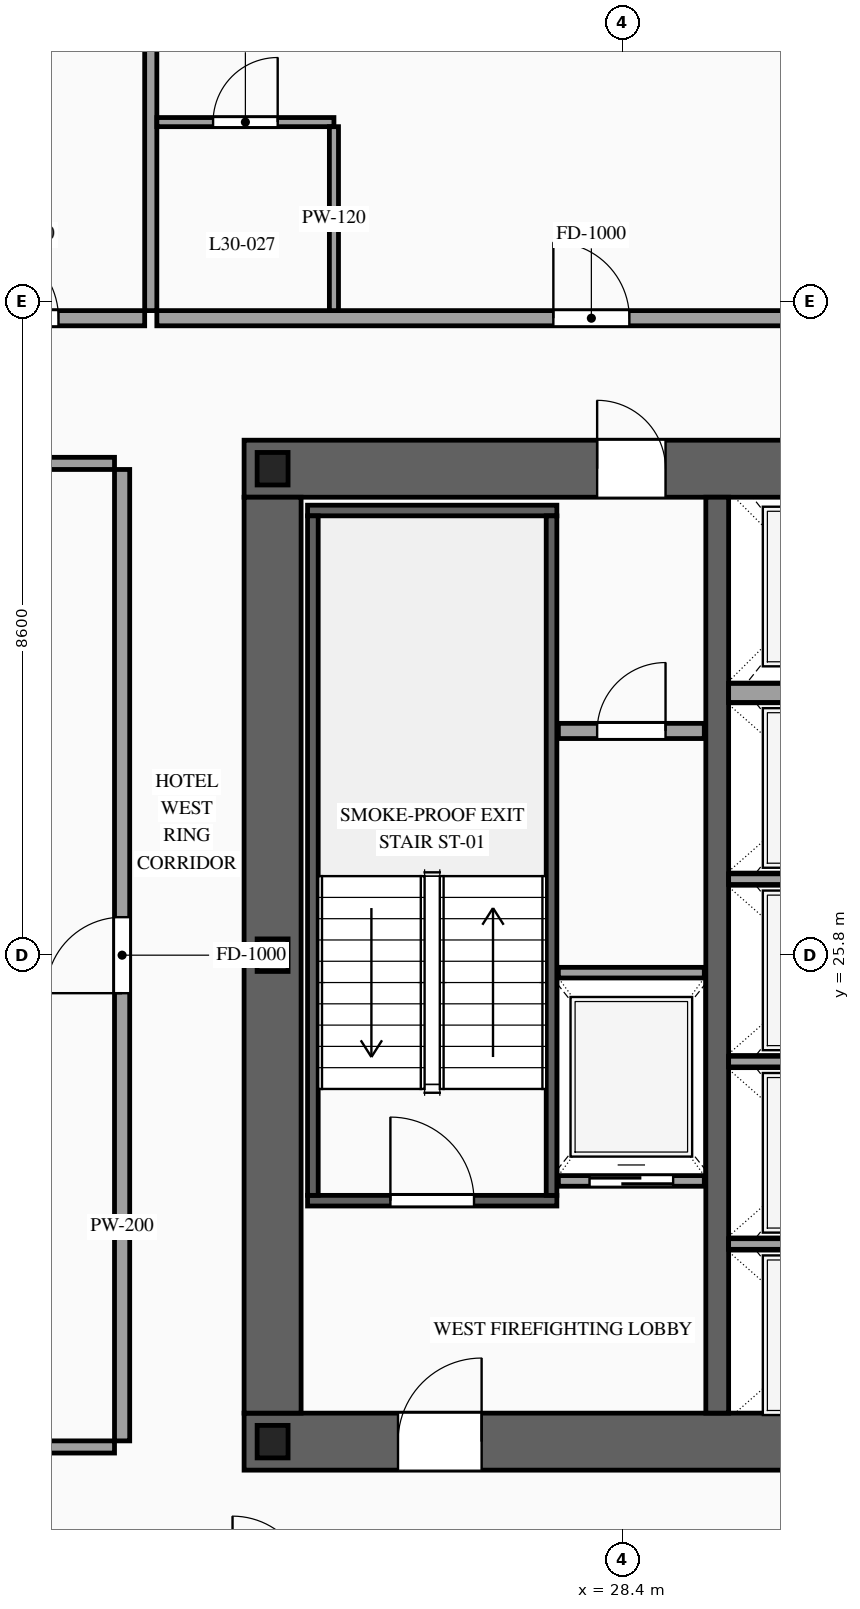
"""IFC4 building model, lengths in metres.
Left out: names, types, materials, properties, quantities, classifications, styles, units other than length and angle.
Written with IfcOpenShell. Run it as: python <this file> out.ifc"""

import sys

from ifc_helpers import new_model, si_unit, direction, frame, frame_2d, origin, origin_2d, place, context, subcontext, project, spatial, rectangle, i_section, extrude, source, transform, mapped, element, fill, save


model = new_model("IFC4")
c1 = context("Model", 3, precision=1e-05, world=origin(), true_north=direction((0.0, 1.0)))
c2 = subcontext(c1, "Body", "Model", "MODEL_VIEW")
j1 = project(units=[si_unit("LENGTHUNIT", "METRE"), si_unit("PLANEANGLEUNIT", "RADIAN")], contexts=[c1])
p1 = place(None, origin())
s1 = spatial("IfcSite", under=j1, at=p1, CompositionType="ELEMENT")
p2 = place(p1, origin())
s2 = spatial("IfcBuilding", under=s1, at=p2, CompositionType="ELEMENT")
p3 = place(p2, frame((0.0, 0.0, 115.4)))
s3 = spatial("IfcBuildingStorey", under=s2, at=p3, CompositionType="ELEMENT", Elevation=115.4)
p4 = place(p3, frame((23.425, 19.4, 0.0), z_axis=(0.0, 0.0, 1.0), x_axis=(1.0, 0.0, 0.0)))
e1 = element("IfcWall", 1, at=p4, inside=s3, PredefinedType="SHEAR", context=c2, shape_type="SweptSolid", body=[
    extrude(rectangle(XDim=27.15, YDim=0.75, at=frame_2d((13.575, 0.0))), origin(), (0.0, 0.0, 1.0), 3.6),
])
p5 = place(p4, frame((2.025, 0.0, 0.0)))
e2 = element("IfcOpeningElement", 2, at=p5, cuts=e1, PredefinedType="OPENING", context=c2, shape_type="SweptSolid", body=[
    extrude(rectangle(XDim=1.1, YDim=2.2, at=frame_2d((0.55, 1.1))), frame((0.0, 0.39, 0.0), z_axis=(0.0, -1.0, 0.0), x_axis=(1.0, 0.0, 0.0)), (0.0, 0.0, 1.0), 0.78),
])
p6 = place(p4, frame((9.925, 0.0, 0.0)))
e3 = element("IfcOpeningElement", 3, at=p6, cuts=e1, PredefinedType="OPENING", context=c2, shape_type="SweptSolid", body=[
    extrude(rectangle(XDim=1.1, YDim=2.2, at=frame_2d((0.55, 1.1))), frame((0.0, 0.39, 0.0), z_axis=(0.0, -1.0, 0.0), x_axis=(1.0, 0.0, 0.0)), (0.0, 0.0, 1.0), 0.78),
])
p7 = place(p4, frame((23.125, 0.0, 0.0)))
e4 = element("IfcOpeningElement", 4, at=p7, cuts=e1, PredefinedType="OPENING", context=c2, shape_type="SweptSolid", body=[
    extrude(rectangle(XDim=1.1, YDim=2.2, at=frame_2d((0.55, 1.1))), frame((0.0, 0.39, 0.0), z_axis=(0.0, -1.0, 0.0), x_axis=(1.0, 0.0, 0.0)), (0.0, 0.0, 1.0), 0.78),
])
p8 = place(p4, frame((19.745, 0.0, 0.0)))
e5 = element("IfcOpeningElement", 5, at=p8, cuts=e1, PredefinedType="OPENING", context=c2, shape_type="SweptSolid", body=[
    extrude(rectangle(XDim=0.9, YDim=2.15, at=frame_2d((0.45, 1.075))), frame((0.0, 0.39, 0.0), z_axis=(0.0, -1.0, 0.0), x_axis=(1.0, 0.0, 0.0)), (0.0, 0.0, 1.0), 0.78),
])
p9 = place(p4, frame((18.305, 0.0, 0.0)))
e6 = element("IfcOpeningElement", 6, at=p9, cuts=e1, PredefinedType="OPENING", context=c2, shape_type="SweptSolid", body=[
    extrude(rectangle(XDim=0.9, YDim=2.15, at=frame_2d((0.45, 1.075))), frame((0.0, 0.39, 0.0), z_axis=(0.0, -1.0, 0.0), x_axis=(1.0, 0.0, 0.0)), (0.0, 0.0, 1.0), 0.78),
])
p10 = place(p3, frame((23.425, 32.2, 0.0), z_axis=(0.0, 0.0, 1.0), x_axis=(1.0, 0.0, 0.0)))
e7 = element("IfcWall", 7, at=p10, inside=s3, PredefinedType="SHEAR", context=c2, shape_type="SweptSolid", body=[
    extrude(rectangle(XDim=27.15, YDim=0.75, at=frame_2d((13.575, 0.0))), origin(), (0.0, 0.0, 1.0), 3.6),
])
p11 = place(p10, frame((4.645, 0.0, 0.0)))
e8 = element("IfcOpeningElement", 8, at=p11, cuts=e7, PredefinedType="OPENING", context=c2, shape_type="SweptSolid", body=[
    extrude(rectangle(XDim=0.9, YDim=2.15, at=frame_2d((0.45, 1.075))), frame((0.0, 0.39, 0.0), z_axis=(0.0, -1.0, 0.0), x_axis=(1.0, 0.0, 0.0)), (0.0, 0.0, 1.0), 0.78),
])
p12 = place(p10, frame((9.925, 0.0, 0.0)))
e9 = element("IfcOpeningElement", 9, at=p12, cuts=e7, PredefinedType="OPENING", context=c2, shape_type="SweptSolid", body=[
    extrude(rectangle(XDim=1.1, YDim=2.2, at=frame_2d((0.55, 1.1))), frame((0.0, 0.39, 0.0), z_axis=(0.0, -1.0, 0.0), x_axis=(1.0, 0.0, 0.0)), (0.0, 0.0, 1.0), 0.78),
])
p13 = place(p10, frame((15.775, 0.0, 0.0)))
e10 = element("IfcOpeningElement", 10, at=p13, cuts=e7, PredefinedType="OPENING", context=c2, shape_type="SweptSolid", body=[
    extrude(rectangle(XDim=1.1, YDim=2.2, at=frame_2d((0.55, 1.1))), frame((0.0, 0.39, 0.0), z_axis=(0.0, -1.0, 0.0), x_axis=(1.0, 0.0, 0.0)), (0.0, 0.0, 1.0), 0.78),
])
p14 = place(p10, frame((18.305, 0.0, 0.0)))
e11 = element("IfcOpeningElement", 11, at=p14, cuts=e7, PredefinedType="OPENING", context=c2, shape_type="SweptSolid", body=[
    extrude(rectangle(XDim=0.9, YDim=2.15, at=frame_2d((0.45, 1.075))), frame((0.0, 0.39, 0.0), z_axis=(0.0, -1.0, 0.0), x_axis=(1.0, 0.0, 0.0)), (0.0, 0.0, 1.0), 0.78),
])
p15 = place(p10, frame((19.745, 0.0, 0.0)))
e12 = element("IfcOpeningElement", 12, at=p15, cuts=e7, PredefinedType="OPENING", context=c2, shape_type="SweptSolid", body=[
    extrude(rectangle(XDim=0.9, YDim=2.15, at=frame_2d((0.45, 1.075))), frame((0.0, 0.39, 0.0), z_axis=(0.0, -1.0, 0.0), x_axis=(1.0, 0.0, 0.0)), (0.0, 0.0, 1.0), 0.78),
])
m1 = source(origin(), c2, "Body", "SweptSolid", [
    extrude(rectangle(XDim=12.05, YDim=0.75, at=frame_2d((6.025, 0.0))), origin(), (0.0, 0.0, 1.0), 3.6),
])
p16 = place(p3, frame((23.8, 19.775, 0.0), z_axis=(0.0, 0.0, 1.0), x_axis=(0.0, 1.0, 0.0)))
e13 = element("IfcWall", 13, at=p16, inside=s3, PredefinedType="SHEAR", context=c2, shape_type="MappedRepresentation", body=[
    mapped(m1, transform((0.0, 0.0, 0.0), scale=1.0)),
])
m2 = source(origin(), c2, "Body", "SweptSolid", [
    extrude(rectangle(XDim=12.05, YDim=0.3, at=frame_2d((6.025, 0.0))), origin(), (0.0, 0.0, 1.0), 3.6),
])
p17 = place(p3, frame((29.65, 19.775, 0.0), z_axis=(0.0, 0.0, 1.0), x_axis=(0.0, 1.0, 0.0)))
e14 = element("IfcWall", 14, at=p17, inside=s3, PredefinedType="SOLIDWALL", context=c2, shape_type="MappedRepresentation", body=[
    mapped(m2, transform((0.0, 0.0, 0.0), scale=1.0)),
])
m3 = source(origin(), c2, "Body", "SweptSolid", [
    extrude(i_section(OverallWidth=0.407, OverallDepth=0.428, WebThickness=0.02, FlangeThickness=0.035, at=origin_2d()), origin(), (0.0, 0.0, 1.0), 3.6),
])
for number, where, z_axis, x_axis in (
    (15, (23.8, 19.4, 0.0), (0.0, 0.0, 1.0), (1.0, 0.0, 0.0)),
    (16, (23.8, 25.8, 0.0), (0.0, 0.0, 1.0), (1.0, 0.0, 0.0)),
    (17, (23.8, 32.2, 0.0), (0.0, 0.0, 1.0), (1.0, 0.0, 0.0)),
):
    element("IfcColumn", number, at=place(p3, frame(where, z_axis=z_axis, x_axis=x_axis)), inside=s3, PredefinedType="COLUMN", context=c2, shape_type="MappedRepresentation", body=[
        mapped(m3, transform((0.0, 0.0, 0.0), scale=1.0)),
    ])
p18 = place(p3, frame((27.56, 22.83, 0.0), z_axis=(0.0, 0.0, 1.0), x_axis=(1.0, 0.0, 0.0)))
e18 = element("IfcWall", 18, at=p18, inside=s3, PredefinedType="SOLIDWALL", context=c2, shape_type="SweptSolid", body=[
    extrude(rectangle(XDim=1.92, YDim=0.14, at=frame_2d((0.96, 0.0))), origin(), (0.0, 0.0, 1.0), 3.38),
])
p19 = place(p18, frame((0.41, 0.0, 0.0)))
e19 = element("IfcOpeningElement", 19, at=p19, cuts=e18, PredefinedType="OPENING", context=c2, shape_type="SweptSolid", body=[
    extrude(rectangle(XDim=1.1, YDim=2.2, at=frame_2d((0.55, 1.1))), frame((0.0, 0.085, 0.0), z_axis=(0.0, -1.0, 0.0), x_axis=(1.0, 0.0, 0.0)), (0.0, 0.0, 1.0), 0.17),
])
m4 = source(origin(), c2, "Body", "SweptSolid", [
    extrude(rectangle(XDim=1.92, YDim=0.14, at=frame_2d((0.96, 0.0))), origin(), (0.0, 0.0, 1.0), 3.38),
])
p20 = place(p3, frame((27.56, 25.57, 0.0), z_axis=(0.0, 0.0, 1.0), x_axis=(1.0, 0.0, 0.0)))
e20 = element("IfcWall", 20, at=p20, inside=s3, PredefinedType="SOLIDWALL", context=c2, shape_type="MappedRepresentation", body=[
    mapped(m4, transform((0.0, 0.0, 0.0), scale=1.0)),
])
m5 = source(origin(), c2, "Body", "SweptSolid", [
    extrude(rectangle(XDim=2.5, YDim=0.14, at=frame_2d((1.25, 0.0))), origin(), (0.0, 0.0, 1.0), 3.38),
])
for number, where, z_axis, x_axis in (
    (21, (29.8, 22.0, 0.0), (0.0, 0.0, 1.0), (1.0, 0.0, 0.0)),
    (22, (29.8, 24.4, 0.0), (0.0, 0.0, 1.0), (1.0, 0.0, 0.0)),
    (23, (29.8, 26.8, 0.0), (0.0, 0.0, 1.0), (1.0, 0.0, 0.0)),
):
    element("IfcWall", number, at=place(p3, frame(where, z_axis=z_axis, x_axis=x_axis)), inside=s3, PredefinedType="SOLIDWALL", context=c2, shape_type="MappedRepresentation", body=[
        mapped(m5, transform((0.0, 0.0, 0.0), scale=1.0)),
    ])
m6 = source(origin(), c2, "Body", "SweptSolid", [
    extrude(rectangle(XDim=2.5, YDim=0.25, at=frame_2d((1.25, 0.0))), origin(), (0.0, 0.0, 1.0), 3.38),
])
p21 = place(p3, frame((29.8, 29.25, 0.0), z_axis=(0.0, 0.0, 1.0), x_axis=(1.0, 0.0, 0.0)))
e24 = element("IfcWall", 24, at=p21, inside=s3, PredefinedType="SOLIDWALL", context=c2, shape_type="MappedRepresentation", body=[
    mapped(m6, transform((0.0, 0.0, 0.0), scale=1.0)),
])
p22 = place(p3, frame((24.26, 22.57, 0.0), z_axis=(0.0, 0.0, 1.0), x_axis=(1.0, 0.0, 0.0)))
e25 = element("IfcWall", 25, at=p22, inside=s3, PredefinedType="SOLIDWALL", context=c2, shape_type="SweptSolid", body=[
    extrude(rectangle(XDim=3.28, YDim=0.14, at=frame_2d((1.64, 0.0))), origin(), (0.0, 0.0, 1.0), 3.38),
])
p23 = place(p22, frame((1.09, 0.0, 0.0)))
e26 = element("IfcOpeningElement", 26, at=p23, cuts=e25, PredefinedType="OPENING", context=c2, shape_type="SweptSolid", body=[
    extrude(rectangle(XDim=1.1, YDim=2.2, at=frame_2d((0.55, 1.1))), frame((0.0, 0.085, 0.0), z_axis=(0.0, -1.0, 0.0), x_axis=(1.0, 0.0, 0.0)), (0.0, 0.0, 1.0), 0.17),
])
m7 = source(origin(), c2, "Body", "SweptSolid", [
    extrude(rectangle(XDim=3.28, YDim=0.14, at=frame_2d((1.64, 0.0))), origin(), (0.0, 0.0, 1.0), 3.38),
])
p24 = place(p3, frame((24.26, 31.65, 0.0), z_axis=(0.0, 0.0, 1.0), x_axis=(1.0, 0.0, 0.0)))
e27 = element("IfcWall", 27, at=p24, inside=s3, PredefinedType="SOLIDWALL", context=c2, shape_type="MappedRepresentation", body=[
    mapped(m7, transform((0.0, 0.0, 0.0), scale=1.0)),
])
m8 = source(origin(), c2, "Body", "SweptSolid", [
    extrude(rectangle(XDim=8.94, YDim=0.14, at=frame_2d((4.47, 0.0))), origin(), (0.0, 0.0, 1.0), 3.38),
])
for number, where, z_axis, x_axis in (
    (28, (24.33, 22.64, 0.0), (0.0, 0.0, 1.0), (0.0, 1.0, 0.0)),
    (29, (27.47, 22.64, 0.0), (0.0, 0.0, 1.0), (0.0, 1.0, 0.0)),
):
    element("IfcWall", number, at=place(p3, frame(where, z_axis=z_axis, x_axis=x_axis)), inside=s3, PredefinedType="SOLIDWALL", context=c2, shape_type="MappedRepresentation", body=[
        mapped(m8, transform((0.0, 0.0, 0.0), scale=1.0)),
    ])
p25 = place(p3, frame((27.56, 28.75, 0.0), z_axis=(0.0, 0.0, 1.0), x_axis=(1.0, 0.0, 0.0)))
e30 = element("IfcWall", 30, at=p25, inside=s3, PredefinedType="PARTITIONING", context=c2, shape_type="SweptSolid", body=[
    extrude(rectangle(XDim=1.92, YDim=0.2, at=frame_2d((0.96, 0.0))), origin(), (0.0, 0.0, 1.0), 3.38),
])
p26 = place(p25, frame((0.51, 0.0, 0.0)))
e31 = element("IfcOpeningElement", 31, at=p26, cuts=e30, PredefinedType="OPENING", context=c2, shape_type="SweptSolid", body=[
    extrude(rectangle(XDim=0.9, YDim=2.15, at=frame_2d((0.45, 1.075))), frame((0.0, 0.115, 0.0), z_axis=(0.0, -1.0, 0.0), x_axis=(1.0, 0.0, 0.0)), (0.0, 0.0, 1.0), 0.23),
])
p27 = place(p3, frame((16.44, 34.18, 0.0), z_axis=(0.0, 0.0, 1.0), x_axis=(1.0, 0.0, 0.0)))
e32 = element("IfcWall", 32, at=p27, inside=s3, PredefinedType="PARTITIONING", context=c2, shape_type="SweptSolid", body=[
    extrude(rectangle(XDim=5.677, YDim=0.2, at=frame_2d((2.838, 0.0))), origin(), (0.0, 0.0, 1.0), 3.38),
])
p28 = place(p27, frame((3.543, 0.0, 0.0)))
e33 = element("IfcOpeningElement", 33, at=p28, cuts=e32, PredefinedType="OPENING", context=c2, shape_type="SweptSolid", body=[
    extrude(rectangle(XDim=1.0, YDim=2.2, at=frame_2d((0.5, 1.1))), frame((0.0, 0.115, 0.0), z_axis=(0.0, -1.0, 0.0), x_axis=(1.0, 0.0, 0.0)), (0.0, 0.0, 1.0), 0.23),
])
m9 = source(origin(), c2, "Body", "SweptSolid", [
    extrude(rectangle(XDim=14.97, YDim=0.16, at=frame_2d((7.485, 0.0))), origin(), (0.0, 0.0, 1.0), 3.38),
])
p29 = place(p3, frame((22.197, 34.28, 0.0), z_axis=(0.0, 0.0, 1.0), x_axis=(0.0, 1.0, 0.0)))
e34 = element("IfcWall", 34, at=p29, inside=s3, PredefinedType="PARTITIONING", context=c2, shape_type="MappedRepresentation", body=[
    mapped(m9, transform((0.0, 0.0, 0.0), scale=1.0)),
])
p30 = place(p3, frame((22.277, 34.18, 0.0), z_axis=(0.0, 0.0, 1.0), x_axis=(1.0, 0.0, 0.0)))
e35 = element("IfcWall", 35, at=p30, inside=s3, PredefinedType="PARTITIONING", context=c2, shape_type="SweptSolid", body=[
    extrude(rectangle(XDim=9.023, YDim=0.2, at=frame_2d((4.511, 0.0))), origin(), (0.0, 0.0, 1.0), 3.38),
])
p31 = place(p30, frame((5.217, 0.0, 0.0)))
e36 = element("IfcOpeningElement", 36, at=p31, cuts=e35, PredefinedType="OPENING", context=c2, shape_type="SweptSolid", body=[
    extrude(rectangle(XDim=1.0, YDim=2.2, at=frame_2d((0.5, 1.1))), frame((0.0, 0.115, 0.0), z_axis=(0.0, -1.0, 0.0), x_axis=(1.0, 0.0, 0.0)), (0.0, 0.0, 1.0), 0.23),
])
p32 = place(p3, frame((22.277, 36.76, 0.0), z_axis=(0.0, 0.0, 1.0), x_axis=(1.0, 0.0, 0.0)))
e37 = element("IfcWall", 37, at=p32, inside=s3, PredefinedType="PARTITIONING", context=c2, shape_type="SweptSolid", body=[
    extrude(rectangle(XDim=2.33, YDim=0.12, at=frame_2d((1.165, 0.0))), origin(), (0.0, 0.0, 1.0), 3.38),
])
p33 = place(p32, frame((0.74, 0.0, 0.0)))
e38 = element("IfcOpeningElement", 38, at=p33, cuts=e37, PredefinedType="OPENING", context=c2, shape_type="SweptSolid", body=[
    extrude(rectangle(XDim=0.85, YDim=2.1, at=frame_2d((0.425, 1.05))), frame((0.0, 0.075, 0.0), z_axis=(0.0, -1.0, 0.0), x_axis=(1.0, 0.0, 0.0)), (0.0, 0.0, 1.0), 0.15),
])
m10 = source(origin(), c2, "Body", "SweptSolid", [
    extrude(rectangle(XDim=2.42, YDim=0.12, at=frame_2d((1.21, 0.0))), origin(), (0.0, 0.0, 1.0), 3.38),
])
p34 = place(p3, frame((24.607, 34.28, 0.0), z_axis=(0.0, 0.0, 1.0), x_axis=(0.0, 1.0, 0.0)))
e39 = element("IfcWall", 39, at=p34, inside=s3, PredefinedType="PARTITIONING", context=c2, shape_type="MappedRepresentation", body=[
    mapped(m10, transform((0.0, 0.0, 0.0), scale=1.0)),
])
p35 = place(p3, frame((21.82, 19.41, 0.0), z_axis=(0.0, 0.0, 1.0), x_axis=(0.0, 1.0, 0.0)))
e40 = element("IfcWall", 40, at=p35, inside=s3, PredefinedType="PARTITIONING", context=c2, shape_type="SweptSolid", body=[
    extrude(rectangle(XDim=12.78, YDim=0.2, at=frame_2d((6.39, 0.0))), origin(), (0.0, 0.0, 1.0), 3.38),
])
p36 = place(p35, frame((5.89, 0.0, 0.0)))
e41 = element("IfcOpeningElement", 41, at=p36, cuts=e40, PredefinedType="OPENING", context=c2, shape_type="SweptSolid", body=[
    extrude(rectangle(XDim=1.0, YDim=2.2, at=frame_2d((0.5, 1.1))), frame((0.0, 0.115, 0.0), z_axis=(0.0, -1.0, 0.0), x_axis=(1.0, 0.0, 0.0)), (0.0, 0.0, 1.0), 0.23),
])
m11 = source(origin(), c2, "Body", "SweptSolid", [
    extrude(rectangle(XDim=8.17, YDim=0.16, at=frame_2d((4.085, 0.0))), origin(), (0.0, 0.0, 1.0), 2.875),
])
for number, where, z_axis, x_axis in (
    (42, (13.55, 19.33, 0.0), (0.0, 0.0, 1.0), (1.0, 0.0, 0.0)),
    (43, (13.55, 32.27, 0.0), (0.0, 0.0, 1.0), (1.0, 0.0, 0.0)),
):
    element("IfcWall", number, at=place(p3, frame(where, z_axis=z_axis, x_axis=x_axis)), inside=s3, PredefinedType="PARTITIONING", context=c2, shape_type="MappedRepresentation", body=[
        mapped(m11, transform((0.0, 0.0, 0.0), scale=1.0)),
    ])
m12 = source(origin(), c2, "Body", "SweptSolid", [
    extrude(rectangle(XDim=1.1, YDim=2.2, at=frame_2d((0.55, 1.1))), frame((0.0, 0.025, 0.0), z_axis=(0.0, -1.0, 0.0), x_axis=(1.0, 0.0, 0.0)), (0.0, 0.0, 1.0), 0.05),
])
p37 = place(p19, origin())
e44 = element("IfcDoor", 44, at=p37, inside=s3, OperationType="SLIDING_TO_LEFT", PredefinedType="DOOR", context=c2, shape_type="MappedRepresentation", body=[
    mapped(m12, transform((0.0, 0.0, 0.0), scale=1.0)),
])
fill(e19, e44)
m13 = source(origin(), c2, "Body", "SweptSolid", [
    extrude(rectangle(XDim=1.1, YDim=2.2, at=frame_2d((0.55, 1.1))), frame((0.0, 0.025, 0.0), z_axis=(0.0, -1.0, 0.0), x_axis=(1.0, 0.0, 0.0)), (0.0, 0.0, 1.0), 0.05),
])
p38 = place(p23, origin())
e45 = element("IfcDoor", 45, at=p38, inside=s3, OperationType="SINGLE_SWING_LEFT", PredefinedType="DOOR", context=c2, shape_type="MappedRepresentation", body=[
    mapped(m13, transform((0.0, 0.0, 0.0), scale=1.0)),
])
fill(e26, e45)
p39 = place(p5, origin())
e46 = element("IfcDoor", 46, at=p39, inside=s3, OperationType="SINGLE_SWING_RIGHT", PredefinedType="DOOR", context=c2, shape_type="MappedRepresentation", body=[
    mapped(m13, transform((0.0, 0.0, 0.0), scale=1.0)),
])
fill(e2, e46)
m14 = source(origin(), c2, "Body", "SweptSolid", [
    extrude(rectangle(XDim=0.9, YDim=2.15, at=frame_2d((0.45, 1.075))), frame((0.0, 0.025, 0.0), z_axis=(0.0, -1.0, 0.0), x_axis=(1.0, 0.0, 0.0)), (0.0, 0.0, 1.0), 0.05),
])
p40 = place(p11, origin())
e47 = element("IfcDoor", 47, at=p40, inside=s3, OperationType="SINGLE_SWING_LEFT", PredefinedType="DOOR", context=c2, shape_type="MappedRepresentation", body=[
    mapped(m14, transform((0.0, 0.0, 0.0), scale=1.0)),
])
fill(e8, e47)
p41 = place(p26, origin())
e48 = element("IfcDoor", 48, at=p41, inside=s3, OperationType="SINGLE_SWING_RIGHT", PredefinedType="DOOR", context=c2, shape_type="MappedRepresentation", body=[
    mapped(m14, transform((0.0, 0.0, 0.0), scale=1.0)),
])
fill(e31, e48)
m15 = source(origin(), c2, "Body", "SweptSolid", [
    extrude(rectangle(XDim=1.0, YDim=2.2, at=frame_2d((0.5, 1.1))), frame((0.0, 0.025, 0.0), z_axis=(0.0, -1.0, 0.0), x_axis=(1.0, 0.0, 0.0)), (0.0, 0.0, 1.0), 0.05),
])
p42 = place(p28, origin())
e49 = element("IfcDoor", 49, at=p42, inside=s3, OperationType="SINGLE_SWING_LEFT", PredefinedType="DOOR", context=c2, shape_type="MappedRepresentation", body=[
    mapped(m15, transform((0.0, 0.0, 0.0), scale=1.0)),
])
fill(e33, e49)
p43 = place(p31, origin())
e50 = element("IfcDoor", 50, at=p43, inside=s3, OperationType="SINGLE_SWING_LEFT", PredefinedType="DOOR", context=c2, shape_type="MappedRepresentation", body=[
    mapped(m15, transform((0.0, 0.0, 0.0), scale=1.0)),
])
fill(e36, e50)
m16 = source(origin(), c2, "Body", "SweptSolid", [
    extrude(rectangle(XDim=0.85, YDim=2.1, at=frame_2d((0.425, 1.05))), frame((0.0, 0.025, 0.0), z_axis=(0.0, -1.0, 0.0), x_axis=(1.0, 0.0, 0.0)), (0.0, 0.0, 1.0), 0.05),
])
p44 = place(p33, origin())
e51 = element("IfcDoor", 51, at=p44, inside=s3, OperationType="SINGLE_SWING_RIGHT", PredefinedType="DOOR", context=c2, shape_type="MappedRepresentation", body=[
    mapped(m16, transform((0.0, 0.0, 0.0), scale=1.0)),
])
fill(e38, e51)
p45 = place(p36, origin())
e52 = element("IfcDoor", 52, at=p45, inside=s3, OperationType="SINGLE_SWING_LEFT", PredefinedType="DOOR", context=c2, shape_type="MappedRepresentation", body=[
    mapped(m15, transform((0.0, 0.0, 0.0), scale=1.0)),
])
fill(e41, e52)
save(model, sys.argv[1])
